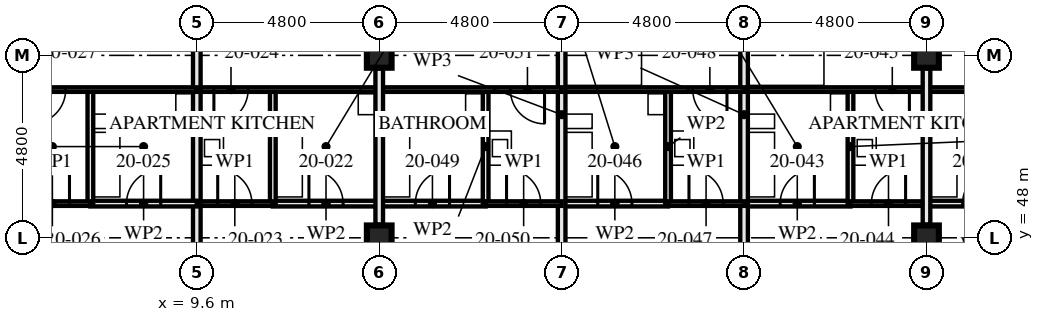
"""IFC4 building model, lengths in metres.
Left out: names, types, materials, properties, quantities, classifications, styles, units other than length and angle.
Written with IfcOpenShell. Run it as: python <this file> out.ifc"""

import sys

from ifc_helpers import new_model, si_unit, direction, frame, frame_2d, origin, origin_2d, place, context, subcontext, project, spatial, rectangle, hollow_rectangle, extrude, element, fill, save


model = new_model("IFC4")
c1 = context("Model", 3, precision=1e-05, world=origin(), true_north=direction((0.0, 1.0)))
c2 = subcontext(c1, "Body", "Model", "MODEL_VIEW")
j1 = project(units=[si_unit("LENGTHUNIT", "METRE"), si_unit("PLANEANGLEUNIT", "RADIAN")], contexts=[c1])
p1 = place(None, origin())
s1 = spatial("IfcSite", under=j1, at=p1, CompositionType="ELEMENT")
p2 = place(p1, origin())
s2 = spatial("IfcBuilding", under=s1, at=p2, CompositionType="ELEMENT")
p3 = place(p2, frame((0.0, 0.0, 76.0)))
s3 = spatial("IfcBuildingStorey", under=s2, at=p3, CompositionType="ELEMENT", Elevation=76.0)
for number, where, z_axis, x_axis in (
    (1, (14.4, 48.0, 0.0), (0.0, 0.0, 1.0), (1.0, 0.0, 0.0)),
    (2, (14.4, 52.8, 0.0), (0.0, 0.0, 1.0), (1.0, 0.0, 0.0)),
    (3, (28.8, 48.0, 0.0), (0.0, 0.0, 1.0), (1.0, 0.0, 0.0)),
    (4, (28.8, 52.8, 0.0), (0.0, 0.0, 1.0), (1.0, 0.0, 0.0)),
):
    element("IfcColumn", number, at=place(p3, frame(where, z_axis=z_axis, x_axis=x_axis)), inside=s3, PredefinedType="COLUMN", context=c2, shape_type="SweptSolid", body=[
        extrude(hollow_rectangle(XDim=0.65, YDim=0.65, WallThickness=0.05, at=origin_2d()), origin(), (0.0, 0.0, 1.0), 3.5),
    ])
p4 = place(p3, frame((11.6, 51.9, 0.0), z_axis=(0.0, 0.0, 1.0), x_axis=(0.0, -1.0, 0.0)))
e5 = element("IfcWall", 5, at=p4, inside=s3, PredefinedType="PARTITIONING", context=c2, shape_type="SweptSolid", body=[
    extrude(rectangle(XDim=3.0, YDim=0.15, at=frame_2d((1.5, 0.0))), origin(), (0.0, 0.0, 1.0), 3.25),
])
p5 = place(p3, frame((14.4, 48.9, 0.0), z_axis=(0.0, 0.0, 1.0), x_axis=(-1.0, 0.0, 0.0)))
e6 = element("IfcWall", 6, at=p5, inside=s3, PredefinedType="PARTITIONING", context=c2, shape_type="SweptSolid", body=[
    extrude(rectangle(XDim=2.8, YDim=0.15, at=frame_2d((1.4, 0.0))), origin(), (0.0, 0.0, 1.0), 3.25),
])
p6 = place(p5, frame((0.95, 0.0, 0.0)))
e7 = element("IfcOpeningElement", 7, at=p6, cuts=e6, PredefinedType="OPENING", context=c2, shape_type="SweptSolid", body=[
    extrude(rectangle(XDim=0.9, YDim=2.1, at=frame_2d((0.45, 1.05))), frame((0.0, 0.085, 0.0), z_axis=(0.0, -1.0, 0.0), x_axis=(1.0, 0.0, 0.0)), (0.0, 0.0, 1.0), 0.171),
])
p7 = place(p3, frame((11.6, 48.9, 0.0), z_axis=(0.0, 0.0, 1.0), x_axis=(-1.0, 0.0, 0.0)))
e8 = element("IfcWall", 8, at=p7, inside=s3, PredefinedType="PARTITIONING", context=c2, shape_type="SweptSolid", body=[
    extrude(rectangle(XDim=2.0, YDim=0.12, at=frame_2d((1.0, 0.0))), origin(), (0.0, 0.0, 1.0), 3.25),
])
p8 = place(p7, frame((0.55, 0.0, 0.0)))
e9 = element("IfcOpeningElement", 9, at=p8, cuts=e8, PredefinedType="OPENING", context=c2, shape_type="SweptSolid", body=[
    extrude(rectangle(XDim=0.9, YDim=2.1, at=frame_2d((0.45, 1.05))), frame((0.0, 0.071, 0.0), z_axis=(0.0, -1.0, 0.0), x_axis=(1.0, 0.0, 0.0)), (0.0, 0.0, 1.0), 0.141),
])
p9 = place(p3, frame((14.4, 51.9, 0.0), z_axis=(0.0, 0.0, 1.0), x_axis=(-1.0, 0.0, 0.0)))
e10 = element("IfcWall", 10, at=p9, inside=s3, PredefinedType="PARTITIONING", context=c2, shape_type="SweptSolid", body=[
    extrude(rectangle(XDim=4.8, YDim=0.12, at=frame_2d((2.4, 0.0))), origin(), (0.0, 0.0, 1.0), 3.25),
])
p10 = place(p9, frame((3.45, 0.0, 0.0)))
e11 = element("IfcOpeningElement", 11, at=p10, cuts=e10, PredefinedType="OPENING", context=c2, shape_type="SweptSolid", body=[
    extrude(rectangle(XDim=0.9, YDim=2.1, at=frame_2d((0.45, 1.05))), frame((0.0, 0.071, 0.0), z_axis=(0.0, -1.0, 0.0), x_axis=(1.0, 0.0, 0.0)), (0.0, 0.0, 1.0), 0.141),
])
p11 = place(p3, frame((9.6, 57.28, 0.0), z_axis=(0.0, 0.0, 1.0), x_axis=(0.0, -1.0, 0.0)))
e12 = element("IfcWall", 12, at=p11, inside=s3, PredefinedType="PARTITIONING", context=c2, shape_type="SweptSolid", body=[
    extrude(rectangle(XDim=12.08, YDim=0.2, at=frame_2d((6.04, 0.0))), origin(), (0.0, 0.0, 1.0), 2.04),
])
p12 = place(p3, frame((6.8, 51.9, 0.0), z_axis=(0.0, 0.0, 1.0), x_axis=(0.0, -1.0, 0.0)))
e13 = element("IfcWall", 13, at=p12, inside=s3, PredefinedType="PARTITIONING", context=c2, shape_type="SweptSolid", body=[
    extrude(rectangle(XDim=3.0, YDim=0.15, at=frame_2d((1.5, 0.0))), origin(), (0.0, 0.0, 1.0), 3.25),
])
p13 = place(p3, frame((9.6, 48.9, 0.0), z_axis=(0.0, 0.0, 1.0), x_axis=(-1.0, 0.0, 0.0)))
e14 = element("IfcWall", 14, at=p13, inside=s3, PredefinedType="PARTITIONING", context=c2, shape_type="SweptSolid", body=[
    extrude(rectangle(XDim=2.8, YDim=0.15, at=frame_2d((1.4, 0.0))), origin(), (0.0, 0.0, 1.0), 3.25),
])
p14 = place(p13, frame((0.95, 0.0, 0.0)))
e15 = element("IfcOpeningElement", 15, at=p14, cuts=e14, PredefinedType="OPENING", context=c2, shape_type="SweptSolid", body=[
    extrude(rectangle(XDim=0.9, YDim=2.1, at=frame_2d((0.45, 1.05))), frame((0.0, 0.085, 0.0), z_axis=(0.0, -1.0, 0.0), x_axis=(1.0, 0.0, 0.0)), (0.0, 0.0, 1.0), 0.171),
])
p15 = place(p3, frame((6.8, 48.9, 0.0), z_axis=(0.0, 0.0, 1.0), x_axis=(-1.0, 0.0, 0.0)))
e16 = element("IfcWall", 16, at=p15, inside=s3, PredefinedType="PARTITIONING", context=c2, shape_type="SweptSolid", body=[
    extrude(rectangle(XDim=2.0, YDim=0.12, at=frame_2d((1.0, 0.0))), origin(), (0.0, 0.0, 1.0), 3.25),
])
p16 = place(p15, frame((0.55, 0.0, 0.0)))
e17 = element("IfcOpeningElement", 17, at=p16, cuts=e16, PredefinedType="OPENING", context=c2, shape_type="SweptSolid", body=[
    extrude(rectangle(XDim=0.9, YDim=2.1, at=frame_2d((0.45, 1.05))), frame((0.0, 0.071, 0.0), z_axis=(0.0, -1.0, 0.0), x_axis=(1.0, 0.0, 0.0)), (0.0, 0.0, 1.0), 0.141),
])
p17 = place(p3, frame((9.6, 51.9, 0.0), z_axis=(0.0, 0.0, 1.0), x_axis=(-1.0, 0.0, 0.0)))
e18 = element("IfcWall", 18, at=p17, inside=s3, PredefinedType="PARTITIONING", context=c2, shape_type="SweptSolid", body=[
    extrude(rectangle(XDim=4.8, YDim=0.12, at=frame_2d((2.4, 0.0))), origin(), (0.0, 0.0, 1.0), 3.25),
])
p18 = place(p17, frame((3.45, 0.0, 0.0)))
e19 = element("IfcOpeningElement", 19, at=p18, cuts=e18, PredefinedType="OPENING", context=c2, shape_type="SweptSolid", body=[
    extrude(rectangle(XDim=0.9, YDim=2.1, at=frame_2d((0.45, 1.05))), frame((0.0, 0.071, 0.0), z_axis=(0.0, -1.0, 0.0), x_axis=(1.0, 0.0, 0.0)), (0.0, 0.0, 1.0), 0.141),
])
p19 = place(p3, frame((26.8, 51.9, 0.0), z_axis=(0.0, 0.0, 1.0), x_axis=(0.0, -1.0, 0.0)))
e20 = element("IfcWall", 20, at=p19, inside=s3, PredefinedType="PARTITIONING", context=c2, shape_type="SweptSolid", body=[
    extrude(rectangle(XDim=3.0, YDim=0.15, at=frame_2d((1.5, 0.0))), origin(), (0.0, 0.0, 1.0), 3.25),
])
p20 = place(p3, frame((26.8, 48.9, 0.0), z_axis=(0.0, 0.0, 1.0), x_axis=(-1.0, 0.0, 0.0)))
e21 = element("IfcWall", 21, at=p20, inside=s3, PredefinedType="PARTITIONING", context=c2, shape_type="SweptSolid", body=[
    extrude(rectangle(XDim=2.8, YDim=0.15, at=frame_2d((1.4, 0.0))), origin(), (0.0, 0.0, 1.0), 3.25),
])
p21 = place(p20, frame((0.95, 0.0, 0.0)))
e22 = element("IfcOpeningElement", 22, at=p21, cuts=e21, PredefinedType="OPENING", context=c2, shape_type="SweptSolid", body=[
    extrude(rectangle(XDim=0.9, YDim=2.1, at=frame_2d((0.45, 1.05))), frame((0.0, 0.085, 0.0), z_axis=(0.0, -1.0, 0.0), x_axis=(1.0, 0.0, 0.0)), (0.0, 0.0, 1.0), 0.171),
])
p22 = place(p3, frame((28.8, 48.9, 0.0), z_axis=(0.0, 0.0, 1.0), x_axis=(-1.0, 0.0, 0.0)))
e23 = element("IfcWall", 23, at=p22, inside=s3, PredefinedType="PARTITIONING", context=c2, shape_type="SweptSolid", body=[
    extrude(rectangle(XDim=2.0, YDim=0.12, at=frame_2d((1.0, 0.0))), origin(), (0.0, 0.0, 1.0), 3.25),
])
p23 = place(p22, frame((0.55, 0.0, 0.0)))
e24 = element("IfcOpeningElement", 24, at=p23, cuts=e23, PredefinedType="OPENING", context=c2, shape_type="SweptSolid", body=[
    extrude(rectangle(XDim=0.9, YDim=2.1, at=frame_2d((0.45, 1.05))), frame((0.0, 0.071, 0.0), z_axis=(0.0, -1.0, 0.0), x_axis=(1.0, 0.0, 0.0)), (0.0, 0.0, 1.0), 0.141),
])
p24 = place(p3, frame((28.8, 51.9, 0.0), z_axis=(0.0, 0.0, 1.0), x_axis=(-1.0, 0.0, 0.0)))
e25 = element("IfcWall", 25, at=p24, inside=s3, PredefinedType="PARTITIONING", context=c2, shape_type="SweptSolid", body=[
    extrude(rectangle(XDim=4.8, YDim=0.12, at=frame_2d((2.4, 0.0))), origin(), (0.0, 0.0, 1.0), 3.25),
])
p25 = place(p24, frame((0.45, 0.0, 0.0)))
e26 = element("IfcOpeningElement", 26, at=p25, cuts=e25, PredefinedType="OPENING", context=c2, shape_type="SweptSolid", body=[
    extrude(rectangle(XDim=0.9, YDim=2.1, at=frame_2d((0.45, 1.05))), frame((0.0, 0.071, 0.0), z_axis=(0.0, -1.0, 0.0), x_axis=(1.0, 0.0, 0.0)), (0.0, 0.0, 1.0), 0.141),
])
p26 = place(p3, frame((24.0, 57.28, 0.0), z_axis=(0.0, 0.0, 1.0), x_axis=(0.0, -1.0, 0.0)))
e27 = element("IfcWall", 27, at=p26, inside=s3, PredefinedType="PARTITIONING", context=c2, shape_type="SweptSolid", body=[
    extrude(rectangle(XDim=12.08, YDim=0.2, at=frame_2d((6.04, 0.0))), origin(), (0.0, 0.0, 1.0), 2.04),
])
p27 = place(p3, frame((22.0, 51.9, 0.0), z_axis=(0.0, 0.0, 1.0), x_axis=(0.0, -1.0, 0.0)))
e28 = element("IfcWall", 28, at=p27, inside=s3, PredefinedType="PARTITIONING", context=c2, shape_type="SweptSolid", body=[
    extrude(rectangle(XDim=3.0, YDim=0.15, at=frame_2d((1.5, 0.0))), origin(), (0.0, 0.0, 1.0), 3.25),
])
p28 = place(p3, frame((22.0, 48.9, 0.0), z_axis=(0.0, 0.0, 1.0), x_axis=(-1.0, 0.0, 0.0)))
e29 = element("IfcWall", 29, at=p28, inside=s3, PredefinedType="PARTITIONING", context=c2, shape_type="SweptSolid", body=[
    extrude(rectangle(XDim=2.8, YDim=0.15, at=frame_2d((1.4, 0.0))), origin(), (0.0, 0.0, 1.0), 3.25),
])
p29 = place(p28, frame((0.95, 0.0, 0.0)))
e30 = element("IfcOpeningElement", 30, at=p29, cuts=e29, PredefinedType="OPENING", context=c2, shape_type="SweptSolid", body=[
    extrude(rectangle(XDim=0.9, YDim=2.1, at=frame_2d((0.45, 1.05))), frame((0.0, 0.085, 0.0), z_axis=(0.0, -1.0, 0.0), x_axis=(1.0, 0.0, 0.0)), (0.0, 0.0, 1.0), 0.171),
])
p30 = place(p3, frame((24.0, 48.9, 0.0), z_axis=(0.0, 0.0, 1.0), x_axis=(-1.0, 0.0, 0.0)))
e31 = element("IfcWall", 31, at=p30, inside=s3, PredefinedType="PARTITIONING", context=c2, shape_type="SweptSolid", body=[
    extrude(rectangle(XDim=2.0, YDim=0.12, at=frame_2d((1.0, 0.0))), origin(), (0.0, 0.0, 1.0), 3.25),
])
p31 = place(p30, frame((0.55, 0.0, 0.0)))
e32 = element("IfcOpeningElement", 32, at=p31, cuts=e31, PredefinedType="OPENING", context=c2, shape_type="SweptSolid", body=[
    extrude(rectangle(XDim=0.9, YDim=2.1, at=frame_2d((0.45, 1.05))), frame((0.0, 0.071, 0.0), z_axis=(0.0, -1.0, 0.0), x_axis=(1.0, 0.0, 0.0)), (0.0, 0.0, 1.0), 0.141),
])
p32 = place(p3, frame((24.0, 51.9, 0.0), z_axis=(0.0, 0.0, 1.0), x_axis=(-1.0, 0.0, 0.0)))
e33 = element("IfcWall", 33, at=p32, inside=s3, PredefinedType="PARTITIONING", context=c2, shape_type="SweptSolid", body=[
    extrude(rectangle(XDim=4.8, YDim=0.12, at=frame_2d((2.4, 0.0))), origin(), (0.0, 0.0, 1.0), 3.25),
])
p33 = place(p32, frame((0.45, 0.0, 0.0)))
e34 = element("IfcOpeningElement", 34, at=p33, cuts=e33, PredefinedType="OPENING", context=c2, shape_type="SweptSolid", body=[
    extrude(rectangle(XDim=0.9, YDim=2.1, at=frame_2d((0.45, 1.05))), frame((0.0, 0.071, 0.0), z_axis=(0.0, -1.0, 0.0), x_axis=(1.0, 0.0, 0.0)), (0.0, 0.0, 1.0), 0.141),
])
p34 = place(p3, frame((19.2, 57.28, 0.0), z_axis=(0.0, 0.0, 1.0), x_axis=(0.0, -1.0, 0.0)))
e35 = element("IfcWall", 35, at=p34, inside=s3, PredefinedType="PARTITIONING", context=c2, shape_type="SweptSolid", body=[
    extrude(rectangle(XDim=12.08, YDim=0.2, at=frame_2d((6.04, 0.0))), origin(), (0.0, 0.0, 1.0), 2.04),
])
p35 = place(p3, frame((17.2, 51.9, 0.0), z_axis=(0.0, 0.0, 1.0), x_axis=(0.0, -1.0, 0.0)))
e36 = element("IfcWall", 36, at=p35, inside=s3, PredefinedType="PARTITIONING", context=c2, shape_type="SweptSolid", body=[
    extrude(rectangle(XDim=3.0, YDim=0.15, at=frame_2d((1.5, 0.0))), origin(), (0.0, 0.0, 1.0), 3.25),
])
p36 = place(p3, frame((17.2, 48.9, 0.0), z_axis=(0.0, 0.0, 1.0), x_axis=(-1.0, 0.0, 0.0)))
e37 = element("IfcWall", 37, at=p36, inside=s3, PredefinedType="PARTITIONING", context=c2, shape_type="SweptSolid", body=[
    extrude(rectangle(XDim=2.8, YDim=0.15, at=frame_2d((1.4, 0.0))), origin(), (0.0, 0.0, 1.0), 3.25),
])
p37 = place(p36, frame((0.95, 0.0, 0.0)))
e38 = element("IfcOpeningElement", 38, at=p37, cuts=e37, PredefinedType="OPENING", context=c2, shape_type="SweptSolid", body=[
    extrude(rectangle(XDim=0.9, YDim=2.1, at=frame_2d((0.45, 1.05))), frame((0.0, 0.085, 0.0), z_axis=(0.0, -1.0, 0.0), x_axis=(1.0, 0.0, 0.0)), (0.0, 0.0, 1.0), 0.171),
])
p38 = place(p3, frame((19.2, 48.9, 0.0), z_axis=(0.0, 0.0, 1.0), x_axis=(-1.0, 0.0, 0.0)))
e39 = element("IfcWall", 39, at=p38, inside=s3, PredefinedType="PARTITIONING", context=c2, shape_type="SweptSolid", body=[
    extrude(rectangle(XDim=2.0, YDim=0.12, at=frame_2d((1.0, 0.0))), origin(), (0.0, 0.0, 1.0), 3.25),
])
p39 = place(p38, frame((0.55, 0.0, 0.0)))
e40 = element("IfcOpeningElement", 40, at=p39, cuts=e39, PredefinedType="OPENING", context=c2, shape_type="SweptSolid", body=[
    extrude(rectangle(XDim=0.9, YDim=2.1, at=frame_2d((0.45, 1.05))), frame((0.0, 0.071, 0.0), z_axis=(0.0, -1.0, 0.0), x_axis=(1.0, 0.0, 0.0)), (0.0, 0.0, 1.0), 0.141),
])
p40 = place(p3, frame((19.2, 51.9, 0.0), z_axis=(0.0, 0.0, 1.0), x_axis=(-1.0, 0.0, 0.0)))
e41 = element("IfcWall", 41, at=p40, inside=s3, PredefinedType="PARTITIONING", context=c2, shape_type="SweptSolid", body=[
    extrude(rectangle(XDim=4.8, YDim=0.12, at=frame_2d((2.4, 0.0))), origin(), (0.0, 0.0, 1.0), 3.25),
])
p41 = place(p40, frame((0.45, 0.0, 0.0)))
e42 = element("IfcOpeningElement", 42, at=p41, cuts=e41, PredefinedType="OPENING", context=c2, shape_type="SweptSolid", body=[
    extrude(rectangle(XDim=0.9, YDim=2.1, at=frame_2d((0.45, 1.05))), frame((0.0, 0.071, 0.0), z_axis=(0.0, -1.0, 0.0), x_axis=(1.0, 0.0, 0.0)), (0.0, 0.0, 1.0), 0.141),
])
p42 = place(p3, frame((31.6, 48.9, 0.0), z_axis=(0.0, 0.0, 1.0), x_axis=(-1.0, 0.0, 0.0)))
e43 = element("IfcWall", 43, at=p42, inside=s3, PredefinedType="PARTITIONING", context=c2, shape_type="SweptSolid", body=[
    extrude(rectangle(XDim=2.8, YDim=0.15, at=frame_2d((1.4, 0.0))), origin(), (0.0, 0.0, 1.0), 3.25),
])
p43 = place(p42, frame((0.95, 0.0, 0.0)))
e44 = element("IfcOpeningElement", 44, at=p43, cuts=e43, PredefinedType="OPENING", context=c2, shape_type="SweptSolid", body=[
    extrude(rectangle(XDim=0.9, YDim=2.1, at=frame_2d((0.45, 1.05))), frame((0.0, 0.085, 0.0), z_axis=(0.0, -1.0, 0.0), x_axis=(1.0, 0.0, 0.0)), (0.0, 0.0, 1.0), 0.171),
])
p44 = place(p3, frame((33.6, 51.9, 0.0), z_axis=(0.0, 0.0, 1.0), x_axis=(-1.0, 0.0, 0.0)))
e45 = element("IfcWall", 45, at=p44, inside=s3, PredefinedType="PARTITIONING", context=c2, shape_type="SweptSolid", body=[
    extrude(rectangle(XDim=4.8, YDim=0.12, at=frame_2d((2.4, 0.0))), origin(), (0.0, 0.0, 1.0), 3.25),
])
p45 = place(p44, frame((0.45, 0.0, 0.0)))
e46 = element("IfcOpeningElement", 46, at=p45, cuts=e45, PredefinedType="OPENING", context=c2, shape_type="SweptSolid", body=[
    extrude(rectangle(XDim=0.9, YDim=2.1, at=frame_2d((0.45, 1.05))), frame((0.0, 0.071, 0.0), z_axis=(0.0, -1.0, 0.0), x_axis=(1.0, 0.0, 0.0)), (0.0, 0.0, 1.0), 0.141),
])
for number, where, z_axis, x_axis in (
    (47, (14.4, 48.345, 0.0), (0.0, 0.0, 1.0), (0.0, 1.0, 0.0)),
    (48, (28.8, 48.345, 0.0), (0.0, 0.0, 1.0), (0.0, 1.0, 0.0)),
):
    element("IfcWall", number, at=place(p3, frame(where, z_axis=z_axis, x_axis=x_axis)), inside=s3, PredefinedType="PARTITIONING", context=c2, shape_type="SweptSolid", body=[
        extrude(rectangle(XDim=4.11, YDim=0.2, at=frame_2d((2.055, 0.0))), origin(), (0.0, 0.0, 1.0), 2.04),
    ])
p46 = place(p6, frame((0.9, 0.0, 0.0), z_axis=(0.0, 0.0, 1.0), x_axis=(-1.0, 0.0, 0.0)))
e49 = element("IfcDoor", 49, at=p46, inside=s3, OperationType="SINGLE_SWING_RIGHT", PredefinedType="DOOR", context=c2, shape_type="SweptSolid", body=[
    extrude(rectangle(XDim=0.9, YDim=2.1, at=frame_2d((0.45, 1.05))), frame((0.0, 0.022, 0.0), z_axis=(0.0, -1.0, 0.0), x_axis=(1.0, 0.0, 0.0)), (0.0, 0.0, 1.0), 0.044),
])
fill(e7, e49)
p47 = place(p8, frame((0.9, 0.0, 0.0), z_axis=(0.0, 0.0, 1.0), x_axis=(-1.0, 0.0, 0.0)))
e50 = element("IfcDoor", 50, at=p47, inside=s3, OperationType="SINGLE_SWING_RIGHT", PredefinedType="DOOR", context=c2, shape_type="SweptSolid", body=[
    extrude(rectangle(XDim=0.9, YDim=2.1, at=frame_2d((0.45, 1.05))), frame((0.0, 0.022, 0.0), z_axis=(0.0, -1.0, 0.0), x_axis=(1.0, 0.0, 0.0)), (0.0, 0.0, 1.0), 0.044),
])
fill(e9, e50)
p48 = place(p10, origin())
e51 = element("IfcDoor", 51, at=p48, inside=s3, OperationType="SINGLE_SWING_LEFT", PredefinedType="DOOR", context=c2, shape_type="SweptSolid", body=[
    extrude(rectangle(XDim=0.9, YDim=2.1, at=frame_2d((0.45, 1.05))), frame((0.0, 0.022, 0.0), z_axis=(0.0, -1.0, 0.0), x_axis=(1.0, 0.0, 0.0)), (0.0, 0.0, 1.0), 0.044),
])
fill(e11, e51)
p49 = place(p14, frame((0.9, 0.0, 0.0), z_axis=(0.0, 0.0, 1.0), x_axis=(-1.0, 0.0, 0.0)))
e52 = element("IfcDoor", 52, at=p49, inside=s3, OperationType="SINGLE_SWING_LEFT", PredefinedType="DOOR", context=c2, shape_type="SweptSolid", body=[
    extrude(rectangle(XDim=0.9, YDim=2.1, at=frame_2d((0.45, 1.05))), frame((0.0, 0.022, 0.0), z_axis=(0.0, -1.0, 0.0), x_axis=(1.0, 0.0, 0.0)), (0.0, 0.0, 1.0), 0.044),
])
fill(e15, e52)
p50 = place(p16, frame((0.9, 0.0, 0.0), z_axis=(0.0, 0.0, 1.0), x_axis=(-1.0, 0.0, 0.0)))
e53 = element("IfcDoor", 53, at=p50, inside=s3, OperationType="SINGLE_SWING_LEFT", PredefinedType="DOOR", context=c2, shape_type="SweptSolid", body=[
    extrude(rectangle(XDim=0.9, YDim=2.1, at=frame_2d((0.45, 1.05))), frame((0.0, 0.022, 0.0), z_axis=(0.0, -1.0, 0.0), x_axis=(1.0, 0.0, 0.0)), (0.0, 0.0, 1.0), 0.044),
])
fill(e17, e53)
p51 = place(p18, origin())
e54 = element("IfcDoor", 54, at=p51, inside=s3, OperationType="SINGLE_SWING_LEFT", PredefinedType="DOOR", context=c2, shape_type="SweptSolid", body=[
    extrude(rectangle(XDim=0.9, YDim=2.1, at=frame_2d((0.45, 1.05))), frame((0.0, 0.022, 0.0), z_axis=(0.0, -1.0, 0.0), x_axis=(1.0, 0.0, 0.0)), (0.0, 0.0, 1.0), 0.044),
])
fill(e19, e54)
p52 = place(p21, frame((0.9, 0.0, 0.0), z_axis=(0.0, 0.0, 1.0), x_axis=(-1.0, 0.0, 0.0)))
e55 = element("IfcDoor", 55, at=p52, inside=s3, OperationType="SINGLE_SWING_LEFT", PredefinedType="DOOR", context=c2, shape_type="SweptSolid", body=[
    extrude(rectangle(XDim=0.9, YDim=2.1, at=frame_2d((0.45, 1.05))), frame((0.0, 0.022, 0.0), z_axis=(0.0, -1.0, 0.0), x_axis=(1.0, 0.0, 0.0)), (0.0, 0.0, 1.0), 0.044),
])
fill(e22, e55)
p53 = place(p23, frame((0.9, 0.0, 0.0), z_axis=(0.0, 0.0, 1.0), x_axis=(-1.0, 0.0, 0.0)))
e56 = element("IfcDoor", 56, at=p53, inside=s3, OperationType="SINGLE_SWING_LEFT", PredefinedType="DOOR", context=c2, shape_type="SweptSolid", body=[
    extrude(rectangle(XDim=0.9, YDim=2.1, at=frame_2d((0.45, 1.05))), frame((0.0, 0.022, 0.0), z_axis=(0.0, -1.0, 0.0), x_axis=(1.0, 0.0, 0.0)), (0.0, 0.0, 1.0), 0.044),
])
fill(e24, e56)
p54 = place(p25, origin())
e57 = element("IfcDoor", 57, at=p54, inside=s3, OperationType="SINGLE_SWING_RIGHT", PredefinedType="DOOR", context=c2, shape_type="SweptSolid", body=[
    extrude(rectangle(XDim=0.9, YDim=2.1, at=frame_2d((0.45, 1.05))), frame((0.0, 0.022, 0.0), z_axis=(0.0, -1.0, 0.0), x_axis=(1.0, 0.0, 0.0)), (0.0, 0.0, 1.0), 0.044),
])
fill(e26, e57)
p55 = place(p29, frame((0.9, 0.0, 0.0), z_axis=(0.0, 0.0, 1.0), x_axis=(-1.0, 0.0, 0.0)))
e58 = element("IfcDoor", 58, at=p55, inside=s3, OperationType="SINGLE_SWING_RIGHT", PredefinedType="DOOR", context=c2, shape_type="SweptSolid", body=[
    extrude(rectangle(XDim=0.9, YDim=2.1, at=frame_2d((0.45, 1.05))), frame((0.0, 0.022, 0.0), z_axis=(0.0, -1.0, 0.0), x_axis=(1.0, 0.0, 0.0)), (0.0, 0.0, 1.0), 0.044),
])
fill(e30, e58)
p56 = place(p31, frame((0.9, 0.0, 0.0), z_axis=(0.0, 0.0, 1.0), x_axis=(-1.0, 0.0, 0.0)))
e59 = element("IfcDoor", 59, at=p56, inside=s3, OperationType="SINGLE_SWING_RIGHT", PredefinedType="DOOR", context=c2, shape_type="SweptSolid", body=[
    extrude(rectangle(XDim=0.9, YDim=2.1, at=frame_2d((0.45, 1.05))), frame((0.0, 0.022, 0.0), z_axis=(0.0, -1.0, 0.0), x_axis=(1.0, 0.0, 0.0)), (0.0, 0.0, 1.0), 0.044),
])
fill(e32, e59)
p57 = place(p33, origin())
e60 = element("IfcDoor", 60, at=p57, inside=s3, OperationType="SINGLE_SWING_RIGHT", PredefinedType="DOOR", context=c2, shape_type="SweptSolid", body=[
    extrude(rectangle(XDim=0.9, YDim=2.1, at=frame_2d((0.45, 1.05))), frame((0.0, 0.022, 0.0), z_axis=(0.0, -1.0, 0.0), x_axis=(1.0, 0.0, 0.0)), (0.0, 0.0, 1.0), 0.044),
])
fill(e34, e60)
p58 = place(p37, frame((0.9, 0.0, 0.0), z_axis=(0.0, 0.0, 1.0), x_axis=(-1.0, 0.0, 0.0)))
e61 = element("IfcDoor", 61, at=p58, inside=s3, OperationType="SINGLE_SWING_LEFT", PredefinedType="DOOR", context=c2, shape_type="SweptSolid", body=[
    extrude(rectangle(XDim=0.9, YDim=2.1, at=frame_2d((0.45, 1.05))), frame((0.0, 0.022, 0.0), z_axis=(0.0, -1.0, 0.0), x_axis=(1.0, 0.0, 0.0)), (0.0, 0.0, 1.0), 0.044),
])
fill(e38, e61)
p59 = place(p39, frame((0.9, 0.0, 0.0), z_axis=(0.0, 0.0, 1.0), x_axis=(-1.0, 0.0, 0.0)))
e62 = element("IfcDoor", 62, at=p59, inside=s3, OperationType="SINGLE_SWING_RIGHT", PredefinedType="DOOR", context=c2, shape_type="SweptSolid", body=[
    extrude(rectangle(XDim=0.9, YDim=2.1, at=frame_2d((0.45, 1.05))), frame((0.0, 0.022, 0.0), z_axis=(0.0, -1.0, 0.0), x_axis=(1.0, 0.0, 0.0)), (0.0, 0.0, 1.0), 0.044),
])
fill(e40, e62)
p60 = place(p41, origin())
e63 = element("IfcDoor", 63, at=p60, inside=s3, OperationType="SINGLE_SWING_RIGHT", PredefinedType="DOOR", context=c2, shape_type="SweptSolid", body=[
    extrude(rectangle(XDim=0.9, YDim=2.1, at=frame_2d((0.45, 1.05))), frame((0.0, 0.022, 0.0), z_axis=(0.0, -1.0, 0.0), x_axis=(1.0, 0.0, 0.0)), (0.0, 0.0, 1.0), 0.044),
])
fill(e42, e63)
p61 = place(p43, frame((0.9, 0.0, 0.0), z_axis=(0.0, 0.0, 1.0), x_axis=(-1.0, 0.0, 0.0)))
e64 = element("IfcDoor", 64, at=p61, inside=s3, OperationType="SINGLE_SWING_LEFT", PredefinedType="DOOR", context=c2, shape_type="SweptSolid", body=[
    extrude(rectangle(XDim=0.9, YDim=2.1, at=frame_2d((0.45, 1.05))), frame((0.0, 0.022, 0.0), z_axis=(0.0, -1.0, 0.0), x_axis=(1.0, 0.0, 0.0)), (0.0, 0.0, 1.0), 0.044),
])
fill(e44, e64)
save(model, sys.argv[1])
